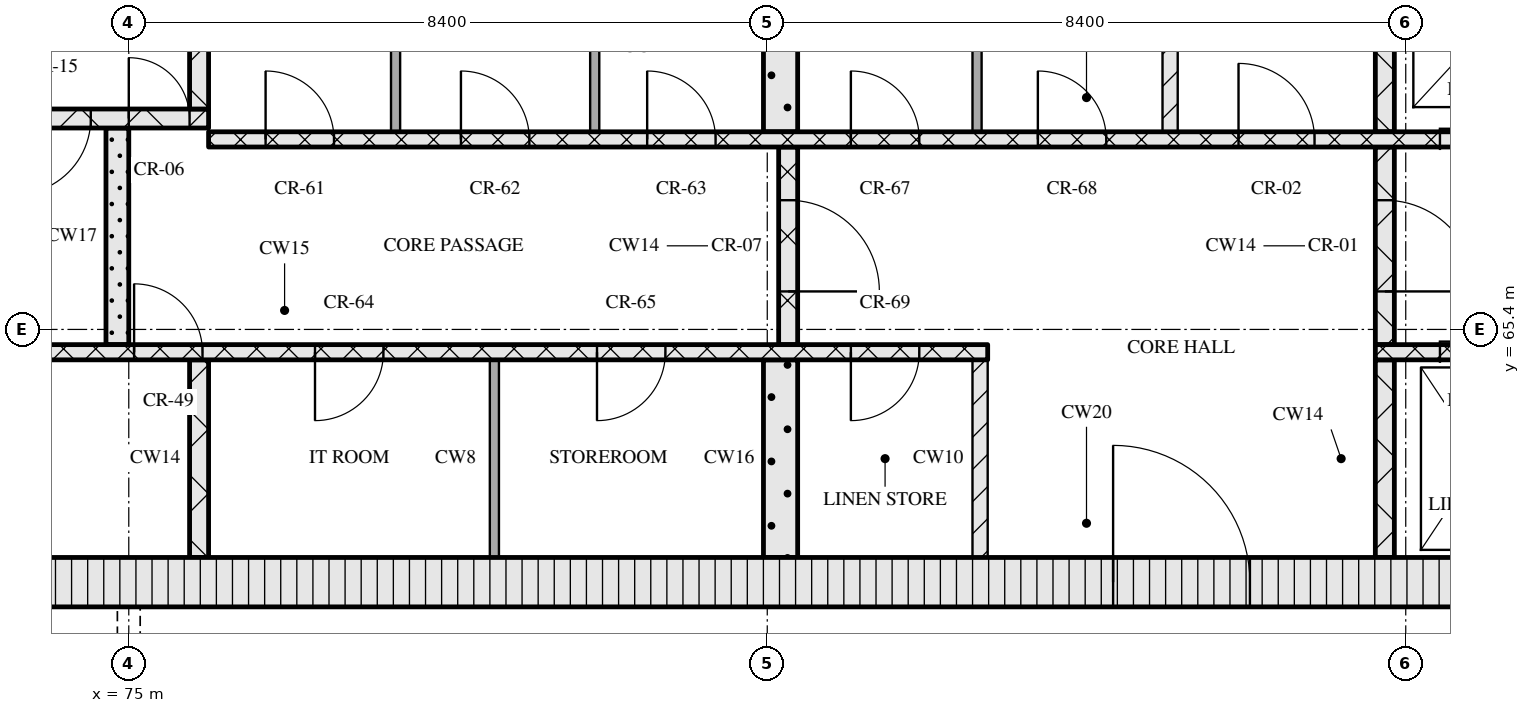
"""IFC4 building model, lengths in metres.
Left out: names, types, materials, properties, quantities, classifications, styles, units other than length and angle.
Written with IfcOpenShell. Run it as: python <this file> out.ifc"""

import sys

from ifc_helpers import new_model, si_unit, direction, frame, frame_2d, origin, place, context, subcontext, project, spatial, rectangle, extrude, element, fill, save


model = new_model("IFC4")
c1 = context("Model", 3, precision=1e-05, world=origin(), true_north=direction((0.0, 1.0)))
c2 = subcontext(c1, "Body", "Model", "MODEL_VIEW")
j1 = project(units=[si_unit("LENGTHUNIT", "METRE"), si_unit("PLANEANGLEUNIT", "RADIAN")], contexts=[c1])
p1 = place(None, origin())
s1 = spatial("IfcSite", under=j1, at=p1, CompositionType="ELEMENT")
p2 = place(p1, origin())
s2 = spatial("IfcBuilding", under=s1, at=p2, CompositionType="ELEMENT")
p3 = place(p2, frame((0.0, 0.0, 237.9)))
s3 = spatial("IfcBuildingStorey", under=s2, at=p3, CompositionType="ELEMENT", Elevation=237.9)
p4 = place(p3, frame((67.15, 62.075, 0.0), z_axis=(0.0, 0.0, 1.0), x_axis=(1.0, 0.0, 0.0)))
e1 = element("IfcWall", 1, at=p4, inside=s3, PredefinedType="SOLIDWALL", context=c2, shape_type="SweptSolid", body=[
    extrude(rectangle(XDim=40.9, YDim=0.65, at=frame_2d((20.45, 0.0))), origin(), (0.0, 0.0, 1.0), 3.32),
])
p5 = place(p4, frame((20.8, 0.0, 0.0)))
e2 = element("IfcOpeningElement", 2, at=p5, cuts=e1, PredefinedType="OPENING", context=c2, shape_type="SweptSolid", body=[
    extrude(rectangle(XDim=1.8, YDim=2.1, at=frame_2d((0.9, 1.05))), frame((0.0, 0.335, 0.0), z_axis=(0.0, -1.0, 0.0), x_axis=(1.0, 0.0, 0.0)), (0.0, 0.0, 1.0), 0.67),
])
p6 = place(p3, frame((75.925, 62.4, 0.0), z_axis=(0.0, 0.0, 1.0), x_axis=(0.0, 1.0, 0.0)))
e3 = element("IfcWall", 3, at=p6, inside=s3, PredefinedType="SOLIDWALL", context=c2, shape_type="SweptSolid", body=[
    extrude(rectangle(XDim=2.6, YDim=0.25, at=frame_2d((1.3, 0.0))), origin(), (0.0, 0.0, 1.0), 3.32),
])
p7 = place(p3, frame((79.81, 62.4, 0.0), z_axis=(0.0, 0.0, 1.0), x_axis=(0.0, 1.0, 0.0)))
e4 = element("IfcWall", 4, at=p7, inside=s3, PredefinedType="PARTITIONING", context=c2, shape_type="SweptSolid", body=[
    extrude(rectangle(XDim=2.6, YDim=0.12, at=frame_2d((1.3, 0.0))), origin(), (0.0, 0.0, 1.0), 3.32),
])
p8 = place(p3, frame((83.575, 62.4, 0.0), z_axis=(0.0, 0.0, 1.0), x_axis=(0.0, 1.0, 0.0)))
e5 = element("IfcWall", 5, at=p8, inside=s3, PredefinedType="SOLIDWALL", context=c2, shape_type="SweptSolid", body=[
    extrude(rectangle(XDim=2.6, YDim=0.45, at=frame_2d((1.3, 0.0))), origin(), (0.0, 0.0, 1.0), 3.32),
])
p9 = place(p3, frame((86.2, 62.4, 0.0), z_axis=(0.0, 0.0, 1.0), x_axis=(0.0, 1.0, 0.0)))
e6 = element("IfcWall", 6, at=p9, inside=s3, PredefinedType="PARTITIONING", context=c2, shape_type="SweptSolid", body=[
    extrude(rectangle(XDim=2.6, YDim=0.2, at=frame_2d((1.3, 0.0))), origin(), (0.0, 0.0, 1.0), 3.32),
])
p10 = place(p3, frame((91.525, 62.4, 0.0), z_axis=(0.0, 0.0, 1.0), x_axis=(0.0, 1.0, 0.0)))
e7 = element("IfcWall", 7, at=p10, inside=s3, PredefinedType="SOLIDWALL", context=c2, shape_type="SweptSolid", body=[
    extrude(rectangle(XDim=2.6, YDim=0.25, at=frame_2d((1.3, 0.0))), origin(), (0.0, 0.0, 1.0), 3.32),
])
p11 = place(p3, frame((67.8, 65.1, 0.0), z_axis=(0.0, 0.0, 1.0), x_axis=(1.0, 0.0, 0.0)))
e8 = element("IfcWall", 8, at=p11, inside=s3, PredefinedType="SOLIDWALL", context=c2, shape_type="SweptSolid", body=[
    extrude(rectangle(XDim=18.5, YDim=0.2, at=frame_2d((9.25, 0.0))), origin(), (0.0, 0.0, 1.0), 3.32),
])
p12 = place(p11, frame((7.27, 0.0, 0.0)))
e9 = element("IfcOpeningElement", 9, at=p12, cuts=e8, PredefinedType="OPENING", context=c2, shape_type="SweptSolid", body=[
    extrude(rectangle(XDim=0.9, YDim=2.1, at=frame_2d((0.45, 1.05))), frame((0.0, 0.11, 0.0), z_axis=(0.0, -1.0, 0.0), x_axis=(1.0, 0.0, 0.0)), (0.0, 0.0, 1.0), 0.22),
])
p13 = place(p11, frame((9.65, 0.0, 0.0)))
e10 = element("IfcOpeningElement", 10, at=p13, cuts=e8, PredefinedType="OPENING", context=c2, shape_type="SweptSolid", body=[
    extrude(rectangle(XDim=0.9, YDim=2.1, at=frame_2d((0.45, 1.05))), frame((0.0, 0.11, 0.0), z_axis=(0.0, -1.0, 0.0), x_axis=(1.0, 0.0, 0.0)), (0.0, 0.0, 1.0), 0.22),
])
p14 = place(p11, frame((13.36, 0.0, 0.0)))
e11 = element("IfcOpeningElement", 11, at=p14, cuts=e8, PredefinedType="OPENING", context=c2, shape_type="SweptSolid", body=[
    extrude(rectangle(XDim=0.9, YDim=2.1, at=frame_2d((0.45, 1.05))), frame((0.0, 0.11, 0.0), z_axis=(0.0, -1.0, 0.0), x_axis=(1.0, 0.0, 0.0)), (0.0, 0.0, 1.0), 0.22),
])
p15 = place(p11, frame((16.7, 0.0, 0.0)))
e12 = element("IfcOpeningElement", 12, at=p15, cuts=e8, PredefinedType="OPENING", context=c2, shape_type="SweptSolid", body=[
    extrude(rectangle(XDim=0.9, YDim=2.1, at=frame_2d((0.45, 1.05))), frame((0.0, 0.11, 0.0), z_axis=(0.0, -1.0, 0.0), x_axis=(1.0, 0.0, 0.0)), (0.0, 0.0, 1.0), 0.22),
])
p16 = place(p3, frame((91.4, 65.1, 0.0), z_axis=(0.0, 0.0, 1.0), x_axis=(1.0, 0.0, 0.0)))
e13 = element("IfcWall", 13, at=p16, inside=s3, PredefinedType="SOLIDWALL", context=c2, shape_type="SweptSolid", body=[
    extrude(rectangle(XDim=16.0, YDim=0.2, at=frame_2d((8.0, 0.0))), origin(), (0.0, 0.0, 1.0), 3.32),
])
p17 = place(p16, frame((0.85, 0.0, 0.0)))
e14 = element("IfcOpeningElement", 14, at=p17, cuts=e13, PredefinedType="OPENING", context=c2, shape_type="SweptSolid", body=[
    extrude(rectangle(XDim=1.1, YDim=2.1, at=frame_2d((0.55, 1.05))), frame((0.0, 0.11, 0.0), z_axis=(0.0, -1.0, 0.0), x_axis=(1.0, 0.0, 0.0)), (0.0, 0.0, 1.0), 0.22),
])
p18 = place(p16, frame((3.35, 0.0, 0.0)))
e15 = element("IfcOpeningElement", 15, at=p18, cuts=e13, PredefinedType="OPENING", context=c2, shape_type="SweptSolid", body=[
    extrude(rectangle(XDim=1.1, YDim=2.1, at=frame_2d((0.55, 1.05))), frame((0.0, 0.11, 0.0), z_axis=(0.0, -1.0, 0.0), x_axis=(1.0, 0.0, 0.0)), (0.0, 0.0, 1.0), 0.22),
])
p19 = place(p16, frame((5.85, 0.0, 0.0)))
e16 = element("IfcOpeningElement", 16, at=p19, cuts=e13, PredefinedType="OPENING", context=c2, shape_type="SweptSolid", body=[
    extrude(rectangle(XDim=1.1, YDim=2.1, at=frame_2d((0.55, 1.05))), frame((0.0, 0.11, 0.0), z_axis=(0.0, -1.0, 0.0), x_axis=(1.0, 0.0, 0.0)), (0.0, 0.0, 1.0), 0.22),
])
p20 = place(p16, frame((7.83, 0.0, 0.0)))
e17 = element("IfcOpeningElement", 17, at=p20, cuts=e13, PredefinedType="OPENING", context=c2, shape_type="SweptSolid", body=[
    extrude(rectangle(XDim=0.9, YDim=2.1, at=frame_2d((0.45, 1.05))), frame((0.0, 0.11, 0.0), z_axis=(0.0, -1.0, 0.0), x_axis=(1.0, 0.0, 0.0)), (0.0, 0.0, 1.0), 0.22),
])
p21 = place(p3, frame((74.85, 65.2, 0.0), z_axis=(0.0, 0.0, 1.0), x_axis=(0.0, 1.0, 0.0)))
e18 = element("IfcWall", 18, at=p21, inside=s3, PredefinedType="SOLIDWALL", context=c2, shape_type="SweptSolid", body=[
    extrude(rectangle(XDim=2.85, YDim=0.3, at=frame_2d((1.425, 0.0))), origin(), (0.0, 0.0, 1.0), 3.32),
])
p22 = place(p3, frame((83.675, 65.2, 0.0), z_axis=(0.0, 0.0, 1.0), x_axis=(0.0, 1.0, 0.0)))
e19 = element("IfcWall", 19, at=p22, inside=s3, PredefinedType="SOLIDWALL", context=c2, shape_type="SweptSolid", body=[
    extrude(rectangle(XDim=2.6, YDim=0.25, at=frame_2d((1.3, 0.0))), origin(), (0.0, 0.0, 1.0), 3.32),
])
p23 = place(p22, frame((0.7, 0.0, 0.0)))
e20 = element("IfcOpeningElement", 20, at=p23, cuts=e19, PredefinedType="OPENING", context=c2, shape_type="SweptSolid", body=[
    extrude(rectangle(XDim=1.2, YDim=2.1, at=frame_2d((0.6, 1.05))), frame((0.0, 0.135, 0.0), z_axis=(0.0, -1.0, 0.0), x_axis=(1.0, 0.0, 0.0)), (0.0, 0.0, 1.0), 0.27),
])
p24 = place(p3, frame((91.525, 65.2, 0.0), z_axis=(0.0, 0.0, 1.0), x_axis=(0.0, 1.0, 0.0)))
e21 = element("IfcWall", 21, at=p24, inside=s3, PredefinedType="SOLIDWALL", context=c2, shape_type="SweptSolid", body=[
    extrude(rectangle(XDim=2.6, YDim=0.25, at=frame_2d((1.3, 0.0))), origin(), (0.0, 0.0, 1.0), 3.32),
])
p25 = place(p24, frame((0.7, 0.0, 0.0)))
e22 = element("IfcOpeningElement", 22, at=p25, cuts=e21, PredefinedType="OPENING", context=c2, shape_type="SweptSolid", body=[
    extrude(rectangle(XDim=1.2, YDim=2.1, at=frame_2d((0.6, 1.05))), frame((0.0, 0.135, 0.0), z_axis=(0.0, -1.0, 0.0), x_axis=(1.0, 0.0, 0.0)), (0.0, 0.0, 1.0), 0.27),
])
p26 = place(p3, frame((76.05, 67.9, 0.0), z_axis=(0.0, 0.0, 1.0), x_axis=(1.0, 0.0, 0.0)))
e23 = element("IfcWall", 23, at=p26, inside=s3, PredefinedType="SOLIDWALL", context=c2, shape_type="SweptSolid", body=[
    extrude(rectangle(XDim=23.1, YDim=0.2, at=frame_2d((11.55, 0.0))), origin(), (0.0, 0.0, 1.0), 3.32),
])
p27 = place(p26, frame((0.75, 0.0, 0.0)))
e24 = element("IfcOpeningElement", 24, at=p27, cuts=e23, PredefinedType="OPENING", context=c2, shape_type="SweptSolid", body=[
    extrude(rectangle(XDim=0.9, YDim=2.1, at=frame_2d((0.45, 1.05))), frame((0.0, 0.11, 0.0), z_axis=(0.0, -1.0, 0.0), x_axis=(1.0, 0.0, 0.0)), (0.0, 0.0, 1.0), 0.22),
])
p28 = place(p26, frame((3.32, 0.0, 0.0)))
e25 = element("IfcOpeningElement", 25, at=p28, cuts=e23, PredefinedType="OPENING", context=c2, shape_type="SweptSolid", body=[
    extrude(rectangle(XDim=0.9, YDim=2.1, at=frame_2d((0.45, 1.05))), frame((0.0, 0.11, 0.0), z_axis=(0.0, -1.0, 0.0), x_axis=(1.0, 0.0, 0.0)), (0.0, 0.0, 1.0), 0.22),
])
p29 = place(p26, frame((5.77, 0.0, 0.0)))
e26 = element("IfcOpeningElement", 26, at=p29, cuts=e23, PredefinedType="OPENING", context=c2, shape_type="SweptSolid", body=[
    extrude(rectangle(XDim=0.9, YDim=2.1, at=frame_2d((0.45, 1.05))), frame((0.0, 0.11, 0.0), z_axis=(0.0, -1.0, 0.0), x_axis=(1.0, 0.0, 0.0)), (0.0, 0.0, 1.0), 0.22),
])
p30 = place(p26, frame((8.45, 0.0, 0.0)))
e27 = element("IfcOpeningElement", 27, at=p30, cuts=e23, PredefinedType="OPENING", context=c2, shape_type="SweptSolid", body=[
    extrude(rectangle(XDim=0.9, YDim=2.1, at=frame_2d((0.45, 1.05))), frame((0.0, 0.11, 0.0), z_axis=(0.0, -1.0, 0.0), x_axis=(1.0, 0.0, 0.0)), (0.0, 0.0, 1.0), 0.22),
])
p31 = place(p26, frame((10.91, 0.0, 0.0)))
e28 = element("IfcOpeningElement", 28, at=p31, cuts=e23, PredefinedType="OPENING", context=c2, shape_type="SweptSolid", body=[
    extrude(rectangle(XDim=0.9, YDim=2.1, at=frame_2d((0.45, 1.05))), frame((0.0, 0.11, 0.0), z_axis=(0.0, -1.0, 0.0), x_axis=(1.0, 0.0, 0.0)), (0.0, 0.0, 1.0), 0.22),
])
p32 = place(p26, frame((13.55, 0.0, 0.0)))
e29 = element("IfcOpeningElement", 29, at=p32, cuts=e23, PredefinedType="OPENING", context=c2, shape_type="SweptSolid", body=[
    extrude(rectangle(XDim=1.0, YDim=2.1, at=frame_2d((0.5, 1.05))), frame((0.0, 0.11, 0.0), z_axis=(0.0, -1.0, 0.0), x_axis=(1.0, 0.0, 0.0)), (0.0, 0.0, 1.0), 0.22),
])
p33 = place(p26, frame((16.2, 0.0, 0.0)))
e30 = element("IfcOpeningElement", 30, at=p33, cuts=e23, PredefinedType="OPENING", context=c2, shape_type="SweptSolid", body=[
    extrude(rectangle(XDim=1.1, YDim=2.1, at=frame_2d((0.55, 1.05))), frame((0.0, 0.11, 0.0), z_axis=(0.0, -1.0, 0.0), x_axis=(1.0, 0.0, 0.0)), (0.0, 0.0, 1.0), 0.22),
])
p34 = place(p26, frame((18.7, 0.0, 0.0)))
e31 = element("IfcOpeningElement", 31, at=p34, cuts=e23, PredefinedType="OPENING", context=c2, shape_type="SweptSolid", body=[
    extrude(rectangle(XDim=1.1, YDim=2.1, at=frame_2d((0.55, 1.05))), frame((0.0, 0.11, 0.0), z_axis=(0.0, -1.0, 0.0), x_axis=(1.0, 0.0, 0.0)), (0.0, 0.0, 1.0), 0.22),
])
p35 = place(p26, frame((21.2, 0.0, 0.0)))
e32 = element("IfcOpeningElement", 32, at=p35, cuts=e23, PredefinedType="OPENING", context=c2, shape_type="SweptSolid", body=[
    extrude(rectangle(XDim=1.1, YDim=2.1, at=frame_2d((0.55, 1.05))), frame((0.0, 0.11, 0.0), z_axis=(0.0, -1.0, 0.0), x_axis=(1.0, 0.0, 0.0)), (0.0, 0.0, 1.0), 0.22),
])
for number, where, z_axis, x_axis in (
    (33, (78.51, 68.0, 0.0), (0.0, 0.0, 1.0), (0.0, 1.0, 0.0)),
    (34, (81.13, 68.0, 0.0), (0.0, 0.0, 1.0), (0.0, 1.0, 0.0)),
):
    element("IfcWall", number, at=place(p3, frame(where, z_axis=z_axis, x_axis=x_axis)), inside=s3, PredefinedType="PARTITIONING", context=c2, shape_type="SweptSolid", body=[
        extrude(rectangle(XDim=2.6, YDim=0.12, at=frame_2d((1.3, 0.0))), origin(), (0.0, 0.0, 1.0), 3.32),
    ])
p36 = place(p3, frame((83.575, 68.0, 0.0), z_axis=(0.0, 0.0, 1.0), x_axis=(0.0, 1.0, 0.0)))
e35 = element("IfcWall", 35, at=p36, inside=s3, PredefinedType="SOLIDWALL", context=c2, shape_type="SweptSolid", body=[
    extrude(rectangle(XDim=2.6, YDim=0.45, at=frame_2d((1.3, 0.0))), origin(), (0.0, 0.0, 1.0), 3.32),
])
p37 = place(p3, frame((86.16, 68.0, 0.0), z_axis=(0.0, 0.0, 1.0), x_axis=(0.0, 1.0, 0.0)))
e36 = element("IfcWall", 36, at=p37, inside=s3, PredefinedType="PARTITIONING", context=c2, shape_type="SweptSolid", body=[
    extrude(rectangle(XDim=2.6, YDim=0.12, at=frame_2d((1.3, 0.0))), origin(), (0.0, 0.0, 1.0), 3.32),
])
p38 = place(p3, frame((88.7, 68.0, 0.0), z_axis=(0.0, 0.0, 1.0), x_axis=(0.0, 1.0, 0.0)))
e37 = element("IfcWall", 37, at=p38, inside=s3, PredefinedType="PARTITIONING", context=c2, shape_type="SweptSolid", body=[
    extrude(rectangle(XDim=2.6, YDim=0.2, at=frame_2d((1.3, 0.0))), origin(), (0.0, 0.0, 1.0), 3.32),
])
p39 = place(p3, frame((91.525, 68.0, 0.0), z_axis=(0.0, 0.0, 1.0), x_axis=(0.0, 1.0, 0.0)))
e38 = element("IfcWall", 38, at=p39, inside=s3, PredefinedType="SOLIDWALL", context=c2, shape_type="SweptSolid", body=[
    extrude(rectangle(XDim=2.6, YDim=0.25, at=frame_2d((1.3, 0.0))), origin(), (0.0, 0.0, 1.0), 3.32),
])
p40 = place(p3, frame((67.8, 68.175, 0.0), z_axis=(0.0, 0.0, 1.0), x_axis=(1.0, 0.0, 0.0)))
e39 = element("IfcWall", 39, at=p40, inside=s3, PredefinedType="SOLIDWALL", context=c2, shape_type="SweptSolid", body=[
    extrude(rectangle(XDim=8.25, YDim=0.25, at=frame_2d((4.125, 0.0))), origin(), (0.0, 0.0, 1.0), 3.32),
])
p41 = place(p40, frame((5.7, 0.0, 0.0)))
e40 = element("IfcOpeningElement", 40, at=p41, cuts=e39, PredefinedType="OPENING", context=c2, shape_type="SweptSolid", body=[
    extrude(rectangle(XDim=1.0, YDim=2.1, at=frame_2d((0.5, 1.05))), frame((0.0, 0.135, 0.0), z_axis=(0.0, -1.0, 0.0), x_axis=(1.0, 0.0, 0.0)), (0.0, 0.0, 1.0), 0.27),
])
p42 = place(p40, frame((7.2, 0.0, 0.0)))
e41 = element("IfcOpeningElement", 41, at=p42, cuts=e39, PredefinedType="OPENING", context=c2, shape_type="SweptSolid", body=[
    extrude(rectangle(XDim=0.8, YDim=2.1, at=frame_2d((0.4, 1.05))), frame((0.0, 0.135, 0.0), z_axis=(0.0, -1.0, 0.0), x_axis=(1.0, 0.0, 0.0)), (0.0, 0.0, 1.0), 0.27),
])
p43 = place(p3, frame((75.925, 68.3, 0.0), z_axis=(0.0, 0.0, 1.0), x_axis=(0.0, 1.0, 0.0)))
e42 = element("IfcWall", 42, at=p43, inside=s3, PredefinedType="SOLIDWALL", context=c2, shape_type="SweptSolid", body=[
    extrude(rectangle(XDim=2.3, YDim=0.25, at=frame_2d((1.15, 0.0))), origin(), (0.0, 0.0, 1.0), 3.32),
])
p44 = place(p5, origin())
e43 = element("IfcDoor", 43, at=p44, inside=s3, OperationType="DOUBLE_DOOR_SINGLE_SWING", PredefinedType="DOOR", context=c2, shape_type="SweptSolid", body=[
    extrude(rectangle(XDim=1.8, YDim=2.1, at=frame_2d((0.9, 1.05))), frame((0.0, 0.025, 0.0), z_axis=(0.0, -1.0, 0.0), x_axis=(1.0, 0.0, 0.0)), (0.0, 0.0, 1.0), 0.05),
])
fill(e2, e43)
p45 = place(p12, origin())
e44 = element("IfcDoor", 44, at=p45, inside=s3, OperationType="SINGLE_SWING_LEFT", PredefinedType="DOOR", context=c2, shape_type="SweptSolid", body=[
    extrude(rectangle(XDim=0.9, YDim=2.1, at=frame_2d((0.45, 1.05))), frame((0.0, 0.025, 0.0), z_axis=(0.0, -1.0, 0.0), x_axis=(1.0, 0.0, 0.0)), (0.0, 0.0, 1.0), 0.05),
])
fill(e9, e44)
p46 = place(p13, origin())
e45 = element("IfcDoor", 45, at=p46, inside=s3, OperationType="SINGLE_SWING_RIGHT", PredefinedType="DOOR", context=c2, shape_type="SweptSolid", body=[
    extrude(rectangle(XDim=0.9, YDim=2.1, at=frame_2d((0.45, 1.05))), frame((0.0, 0.025, 0.0), z_axis=(0.0, -1.0, 0.0), x_axis=(1.0, 0.0, 0.0)), (0.0, 0.0, 1.0), 0.05),
])
fill(e10, e45)
p47 = place(p14, origin())
e46 = element("IfcDoor", 46, at=p47, inside=s3, OperationType="SINGLE_SWING_RIGHT", PredefinedType="DOOR", context=c2, shape_type="SweptSolid", body=[
    extrude(rectangle(XDim=0.9, YDim=2.1, at=frame_2d((0.45, 1.05))), frame((0.0, 0.025, 0.0), z_axis=(0.0, -1.0, 0.0), x_axis=(1.0, 0.0, 0.0)), (0.0, 0.0, 1.0), 0.05),
])
fill(e11, e46)
p48 = place(p15, origin())
e47 = element("IfcDoor", 47, at=p48, inside=s3, OperationType="SINGLE_SWING_RIGHT", PredefinedType="DOOR", context=c2, shape_type="SweptSolid", body=[
    extrude(rectangle(XDim=0.9, YDim=2.1, at=frame_2d((0.45, 1.05))), frame((0.0, 0.025, 0.0), z_axis=(0.0, -1.0, 0.0), x_axis=(1.0, 0.0, 0.0)), (0.0, 0.0, 1.0), 0.05),
])
fill(e12, e47)
p49 = place(p17, origin())
e48 = element("IfcDoor", 48, at=p49, inside=s3, OperationType="SLIDING_TO_LEFT", PredefinedType="DOOR", context=c2, shape_type="SweptSolid", body=[
    extrude(rectangle(XDim=1.1, YDim=2.1, at=frame_2d((0.55, 1.05))), frame((0.0, 0.025, 0.0), z_axis=(0.0, -1.0, 0.0), x_axis=(1.0, 0.0, 0.0)), (0.0, 0.0, 1.0), 0.05),
])
fill(e14, e48)
p50 = place(p23, origin())
e49 = element("IfcDoor", 49, at=p50, inside=s3, OperationType="SINGLE_SWING_RIGHT", PredefinedType="DOOR", context=c2, shape_type="SweptSolid", body=[
    extrude(rectangle(XDim=1.2, YDim=2.1, at=frame_2d((0.6, 1.05))), frame((0.0, 0.025, 0.0), z_axis=(0.0, -1.0, 0.0), x_axis=(1.0, 0.0, 0.0)), (0.0, 0.0, 1.0), 0.05),
])
fill(e20, e49)
p51 = place(p25, origin())
e50 = element("IfcDoor", 50, at=p51, inside=s3, OperationType="SINGLE_SWING_RIGHT", PredefinedType="DOOR", context=c2, shape_type="SweptSolid", body=[
    extrude(rectangle(XDim=1.2, YDim=2.1, at=frame_2d((0.6, 1.05))), frame((0.0, 0.025, 0.0), z_axis=(0.0, -1.0, 0.0), x_axis=(1.0, 0.0, 0.0)), (0.0, 0.0, 1.0), 0.05),
])
fill(e22, e50)
p52 = place(p27, origin())
e51 = element("IfcDoor", 51, at=p52, inside=s3, OperationType="SINGLE_SWING_LEFT", PredefinedType="DOOR", context=c2, shape_type="SweptSolid", body=[
    extrude(rectangle(XDim=0.9, YDim=2.1, at=frame_2d((0.45, 1.05))), frame((0.0, 0.025, 0.0), z_axis=(0.0, -1.0, 0.0), x_axis=(1.0, 0.0, 0.0)), (0.0, 0.0, 1.0), 0.05),
])
fill(e24, e51)
p53 = place(p28, origin())
e52 = element("IfcDoor", 52, at=p53, inside=s3, OperationType="SINGLE_SWING_LEFT", PredefinedType="DOOR", context=c2, shape_type="SweptSolid", body=[
    extrude(rectangle(XDim=0.9, YDim=2.1, at=frame_2d((0.45, 1.05))), frame((0.0, 0.025, 0.0), z_axis=(0.0, -1.0, 0.0), x_axis=(1.0, 0.0, 0.0)), (0.0, 0.0, 1.0), 0.05),
])
fill(e25, e52)
p54 = place(p29, origin())
e53 = element("IfcDoor", 53, at=p54, inside=s3, OperationType="SINGLE_SWING_LEFT", PredefinedType="DOOR", context=c2, shape_type="SweptSolid", body=[
    extrude(rectangle(XDim=0.9, YDim=2.1, at=frame_2d((0.45, 1.05))), frame((0.0, 0.025, 0.0), z_axis=(0.0, -1.0, 0.0), x_axis=(1.0, 0.0, 0.0)), (0.0, 0.0, 1.0), 0.05),
])
fill(e26, e53)
p55 = place(p30, origin())
e54 = element("IfcDoor", 54, at=p55, inside=s3, OperationType="SINGLE_SWING_LEFT", PredefinedType="DOOR", context=c2, shape_type="SweptSolid", body=[
    extrude(rectangle(XDim=0.9, YDim=2.1, at=frame_2d((0.45, 1.05))), frame((0.0, 0.025, 0.0), z_axis=(0.0, -1.0, 0.0), x_axis=(1.0, 0.0, 0.0)), (0.0, 0.0, 1.0), 0.05),
])
fill(e27, e54)
p56 = place(p31, origin())
e55 = element("IfcDoor", 55, at=p56, inside=s3, OperationType="SINGLE_SWING_LEFT", PredefinedType="DOOR", context=c2, shape_type="SweptSolid", body=[
    extrude(rectangle(XDim=0.9, YDim=2.1, at=frame_2d((0.45, 1.05))), frame((0.0, 0.025, 0.0), z_axis=(0.0, -1.0, 0.0), x_axis=(1.0, 0.0, 0.0)), (0.0, 0.0, 1.0), 0.05),
])
fill(e28, e55)
p57 = place(p32, origin())
e56 = element("IfcDoor", 56, at=p57, inside=s3, OperationType="SINGLE_SWING_LEFT", PredefinedType="DOOR", context=c2, shape_type="SweptSolid", body=[
    extrude(rectangle(XDim=1.0, YDim=2.1, at=frame_2d((0.5, 1.05))), frame((0.0, 0.025, 0.0), z_axis=(0.0, -1.0, 0.0), x_axis=(1.0, 0.0, 0.0)), (0.0, 0.0, 1.0), 0.05),
])
fill(e29, e56)
p58 = place(p33, origin())
e57 = element("IfcDoor", 57, at=p58, inside=s3, OperationType="SLIDING_TO_RIGHT", PredefinedType="DOOR", context=c2, shape_type="SweptSolid", body=[
    extrude(rectangle(XDim=1.1, YDim=2.1, at=frame_2d((0.55, 1.05))), frame((0.0, 0.025, 0.0), z_axis=(0.0, -1.0, 0.0), x_axis=(1.0, 0.0, 0.0)), (0.0, 0.0, 1.0), 0.05),
])
fill(e30, e57)
p59 = place(p41, origin())
e58 = element("IfcDoor", 58, at=p59, inside=s3, OperationType="SINGLE_SWING_RIGHT", PredefinedType="DOOR", context=c2, shape_type="SweptSolid", body=[
    extrude(rectangle(XDim=1.0, YDim=2.1, at=frame_2d((0.5, 1.05))), frame((0.0, 0.025, 0.0), z_axis=(0.0, -1.0, 0.0), x_axis=(1.0, 0.0, 0.0)), (0.0, 0.0, 1.0), 0.05),
])
fill(e40, e58)
p60 = place(p42, origin())
e59 = element("IfcDoor", 59, at=p60, inside=s3, OperationType="SINGLE_SWING_LEFT", PredefinedType="DOOR", context=c2, shape_type="SweptSolid", body=[
    extrude(rectangle(XDim=0.8, YDim=2.1, at=frame_2d((0.4, 1.05))), frame((0.0, 0.025, 0.0), z_axis=(0.0, -1.0, 0.0), x_axis=(1.0, 0.0, 0.0)), (0.0, 0.0, 1.0), 0.05),
])
fill(e41, e59)
save(model, sys.argv[1])
